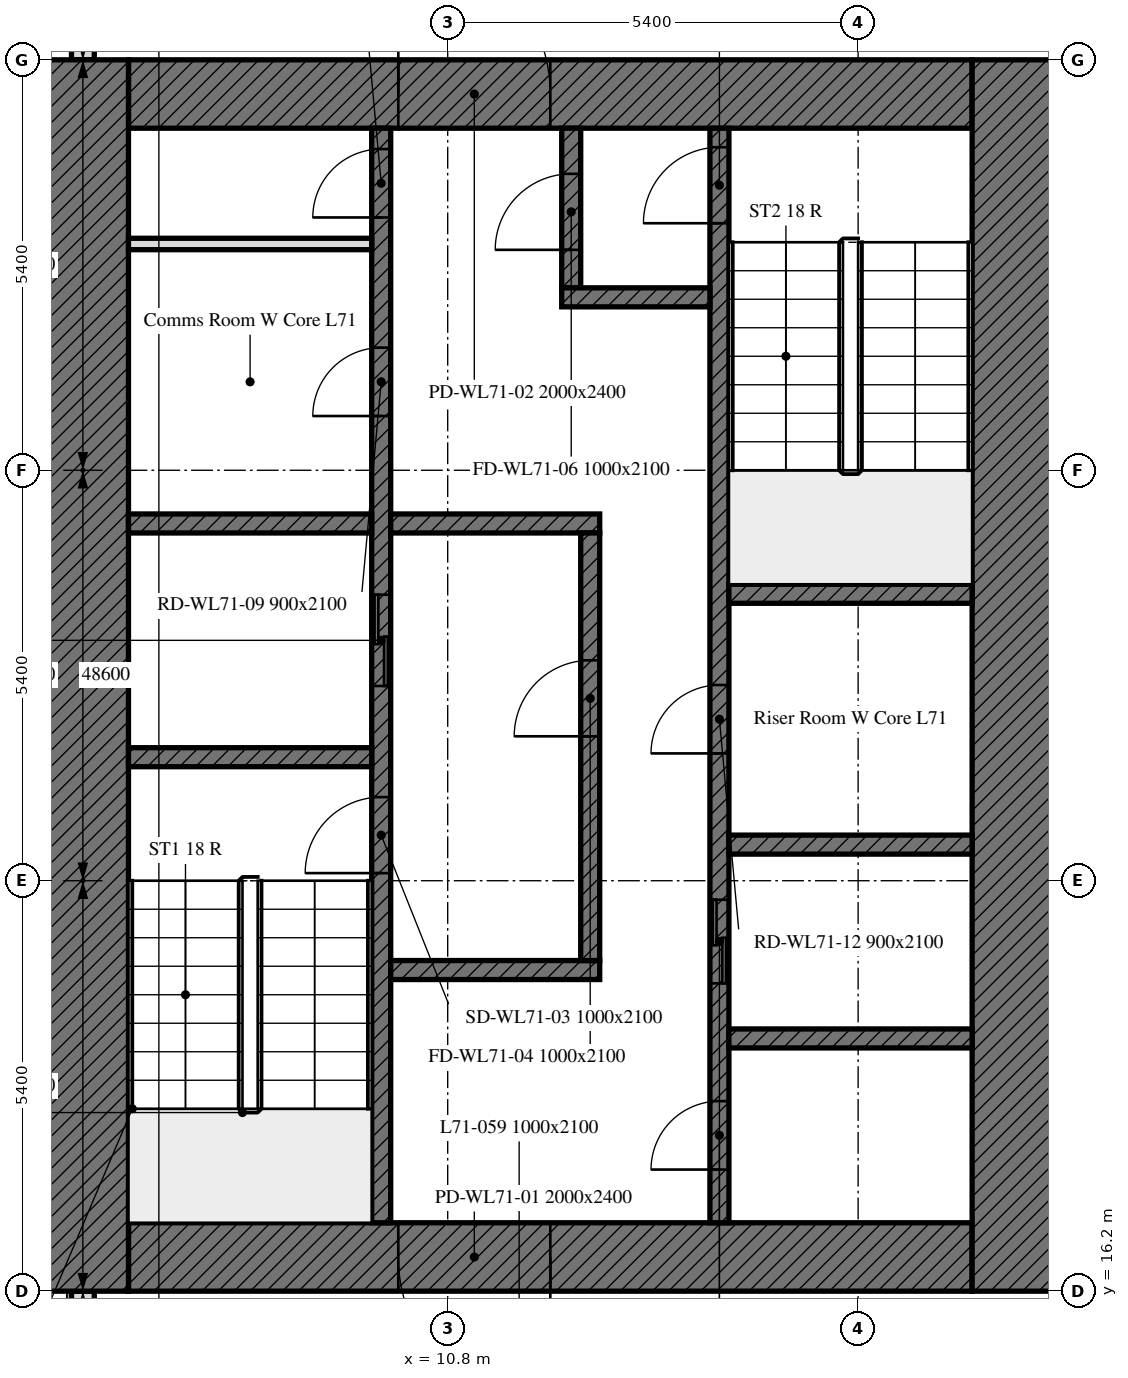
"""IFC4 building model, lengths in metres.
Left out: names, types, materials, properties, quantities, classifications, styles, units other than length and angle.
Written with IfcOpenShell. Run it as: python <this file> out.ifc"""

import sys

from ifc_helpers import new_model, si_unit, direction, frame, frame_2d, origin, place, context, subcontext, project, spatial, rectangle, extrude, element, fill, save


model = new_model("IFC4")
c1 = context("Model", 3, precision=1e-05, world=origin(), true_north=direction((0.0, 1.0)))
c2 = subcontext(c1, "Body", "Model", "MODEL_VIEW")
j1 = project(units=[si_unit("LENGTHUNIT", "METRE"), si_unit("PLANEANGLEUNIT", "RADIAN")], contexts=[c1])
p1 = place(None, origin())
s1 = spatial("IfcSite", under=j1, at=p1, CompositionType="ELEMENT")
p2 = place(p1, origin())
s2 = spatial("IfcBuilding", under=s1, at=p2, CompositionType="ELEMENT")
p3 = place(p2, frame((0.0, 0.0, 288.4)))
s3 = spatial("IfcBuildingStorey", under=s2, at=p3, CompositionType="ELEMENT", Elevation=288.4)
p4 = place(p3, frame((6.0, 43.014, 0.0), z_axis=(0.0, 0.0, 1.0), x_axis=(0.0, -1.0, 0.0)))
e1 = element("IfcWall", 1, at=p4, inside=s3, PredefinedType="SOLIDWALL", context=c2, shape_type="SweptSolid", body=[
    extrude(rectangle(XDim=10.614, YDim=0.3, at=frame_2d((5.307, 0.0))), origin(), (0.0, 0.0, 1.0), 3.0),
])
p5 = place(p4, frame((1.789, 0.0, 0.9)))
e2 = element("IfcOpeningElement", 2, at=p5, cuts=e1, PredefinedType="OPENING", context=c2, shape_type="SweptSolid", body=[
    extrude(rectangle(XDim=0.65, YDim=1.7, at=frame_2d((0.325, 0.85))), frame((0.0, 0.16, 0.0), z_axis=(0.0, -1.0, 0.0), x_axis=(1.0, 0.0, 0.0)), (0.0, 0.0, 1.0), 0.32),
])
p6 = place(p4, frame((2.764, 0.0, 0.9)))
e3 = element("IfcOpeningElement", 3, at=p6, cuts=e1, PredefinedType="OPENING", context=c2, shape_type="SweptSolid", body=[
    extrude(rectangle(XDim=1.1, YDim=1.7, at=frame_2d((0.55, 0.85))), frame((0.0, 0.16, 0.0), z_axis=(0.0, -1.0, 0.0), x_axis=(1.0, 0.0, 0.0)), (0.0, 0.0, 1.0), 0.32),
])
p7 = place(p4, frame((6.564, 0.0, 0.9)))
e4 = element("IfcOpeningElement", 4, at=p7, cuts=e1, PredefinedType="OPENING", context=c2, shape_type="SweptSolid", body=[
    extrude(rectangle(XDim=1.1, YDim=1.7, at=frame_2d((0.55, 0.85))), frame((0.0, 0.16, 0.0), z_axis=(0.0, -1.0, 0.0), x_axis=(1.0, 0.0, 0.0)), (0.0, 0.0, 1.0), 0.32),
])
p8 = place(p4, frame((8.539, 0.0, 0.9)))
e5 = element("IfcOpeningElement", 5, at=p8, cuts=e1, PredefinedType="OPENING", context=c2, shape_type="SweptSolid", body=[
    extrude(rectangle(XDim=0.65, YDim=1.7, at=frame_2d((0.325, 0.85))), frame((0.0, 0.16, 0.0), z_axis=(0.0, -1.0, 0.0), x_axis=(1.0, 0.0, 0.0)), (0.0, 0.0, 1.0), 0.32),
])
p9 = place(p3, frame((6.0, 16.2, 0.0), z_axis=(0.0, 0.0, 1.0), x_axis=(0.0, -1.0, 0.0)))
e6 = element("IfcWall", 6, at=p9, inside=s3, PredefinedType="SOLIDWALL", context=c2, shape_type="SweptSolid", body=[
    extrude(rectangle(XDim=5.214, YDim=0.3, at=frame_2d((2.607, 0.0))), origin(), (0.0, 0.0, 1.0), 3.0),
])
p10 = place(p9, frame((1.0, 0.0, 0.9)))
e7 = element("IfcOpeningElement", 7, at=p10, cuts=e6, PredefinedType="OPENING", context=c2, shape_type="SweptSolid", body=[
    extrude(rectangle(XDim=1.1, YDim=1.7, at=frame_2d((0.55, 0.85))), frame((0.0, 0.16, 0.0), z_axis=(0.0, -1.0, 0.0), x_axis=(1.0, 0.0, 0.0)), (0.0, 0.0, 1.0), 0.32),
])
p11 = place(p9, frame((2.95, 0.0, 0.9)))
e8 = element("IfcOpeningElement", 8, at=p11, cuts=e6, PredefinedType="OPENING", context=c2, shape_type="SweptSolid", body=[
    extrude(rectangle(XDim=1.1, YDim=1.7, at=frame_2d((0.55, 0.85))), frame((0.0, 0.16, 0.0), z_axis=(0.0, -1.0, 0.0), x_axis=(1.0, 0.0, 0.0)), (0.0, 0.0, 1.0), 0.32),
])
p12 = place(p3, frame((17.7, 16.65, 0.0), z_axis=(0.0, 0.0, 1.0), x_axis=(-1.0, 0.0, 0.0)))
e9 = element("IfcWall", 9, at=p12, inside=s3, PredefinedType="SOLIDWALL", context=c2, shape_type="SweptSolid", body=[
    extrude(rectangle(XDim=11.1, YDim=0.9, at=frame_2d((5.55, 0.0))), origin(), (0.0, 0.0, 1.0), 3.0),
])
p13 = place(p12, frame((5.55, 0.0, 0.0)))
e10 = element("IfcOpeningElement", 10, at=p13, cuts=e9, PredefinedType="OPENING", context=c2, shape_type="SweptSolid", body=[
    extrude(rectangle(XDim=2.0, YDim=2.4, at=frame_2d((1.0, 1.2))), frame((0.0, 0.45, 0.0), z_axis=(0.0, -1.0, 0.0), x_axis=(1.0, 0.0, 0.0)), (0.0, 0.0, 1.0), 0.9),
])
p14 = place(p3, frame((6.6, 31.95, 0.0), z_axis=(0.0, 0.0, 1.0), x_axis=(1.0, 0.0, 0.0)))
e11 = element("IfcWall", 11, at=p14, inside=s3, PredefinedType="SOLIDWALL", context=c2, shape_type="SweptSolid", body=[
    extrude(rectangle(XDim=11.1, YDim=0.9, at=frame_2d((5.55, 0.0))), origin(), (0.0, 0.0, 1.0), 3.0),
])
p15 = place(p14, frame((3.55, 0.0, 0.0)))
e12 = element("IfcOpeningElement", 12, at=p15, cuts=e11, PredefinedType="OPENING", context=c2, shape_type="SweptSolid", body=[
    extrude(rectangle(XDim=2.0, YDim=2.4, at=frame_2d((1.0, 1.2))), frame((0.0, 0.45, 0.0), z_axis=(0.0, -1.0, 0.0), x_axis=(1.0, 0.0, 0.0)), (0.0, 0.0, 1.0), 0.9),
])
for number, where, z_axis, x_axis in (
    (13, (6.0, 16.2, 0.0), (0.0, 0.0, 1.0), (0.0, 1.0, 0.0)),
    (14, (18.3, 32.4, 0.0), (0.0, 0.0, 1.0), (0.0, -1.0, 0.0)),
):
    element("IfcWall", number, at=place(p3, frame(where, z_axis=z_axis, x_axis=x_axis)), inside=s3, PredefinedType="SOLIDWALL", context=c2, shape_type="SweptSolid", body=[
        extrude(rectangle(XDim=16.2, YDim=1.2, at=frame_2d((8.1, 0.0))), origin(), (0.0, 0.0, 1.0), 3.0),
    ])
p16 = place(p3, frame((9.925, 17.1, 0.0), z_axis=(0.0, 0.0, 1.0), x_axis=(0.0, 1.0, 0.0)))
e15 = element("IfcWall", 15, at=p16, inside=s3, PredefinedType="SOLIDWALL", context=c2, shape_type="SweptSolid", body=[
    extrude(rectangle(XDim=14.4, YDim=0.25, at=frame_2d((7.2, 0.0))), origin(), (0.0, 0.0, 1.0), 3.0),
])
p17 = place(p16, frame((4.6, 0.0, 0.0)))
e16 = element("IfcOpeningElement", 16, at=p17, cuts=e15, PredefinedType="OPENING", context=c2, shape_type="SweptSolid", body=[
    extrude(rectangle(XDim=1.0, YDim=2.1, at=frame_2d((0.5, 1.05))), frame((0.0, 0.125, 0.0), z_axis=(0.0, -1.0, 0.0), x_axis=(1.0, 0.0, 0.0)), (0.0, 0.0, 1.0), 0.25),
])
p18 = place(p16, frame((7.062, 0.0, 0.0)))
e17 = element("IfcOpeningElement", 17, at=p18, cuts=e15, PredefinedType="OPENING", context=c2, shape_type="SweptSolid", body=[
    extrude(rectangle(XDim=1.2, YDim=2.1, at=frame_2d((0.6, 1.05))), frame((0.0, 0.125, 0.0), z_axis=(0.0, -1.0, 0.0), x_axis=(1.0, 0.0, 0.0)), (0.0, 0.0, 1.0), 0.25),
])
p19 = place(p16, frame((10.614, 0.0, 0.0)))
e18 = element("IfcOpeningElement", 18, at=p19, cuts=e15, PredefinedType="OPENING", context=c2, shape_type="SweptSolid", body=[
    extrude(rectangle(XDim=0.9, YDim=2.1, at=frame_2d((0.45, 1.05))), frame((0.0, 0.125, 0.0), z_axis=(0.0, -1.0, 0.0), x_axis=(1.0, 0.0, 0.0)), (0.0, 0.0, 1.0), 0.25),
])
p20 = place(p16, frame((13.226, 0.0, 0.0)))
e19 = element("IfcOpeningElement", 19, at=p20, cuts=e15, PredefinedType="OPENING", context=c2, shape_type="SweptSolid", body=[
    extrude(rectangle(XDim=0.9, YDim=2.1, at=frame_2d((0.45, 1.05))), frame((0.0, 0.125, 0.0), z_axis=(0.0, -1.0, 0.0), x_axis=(1.0, 0.0, 0.0)), (0.0, 0.0, 1.0), 0.25),
])
p21 = place(p3, frame((14.375, 17.1, 0.0), z_axis=(0.0, 0.0, 1.0), x_axis=(0.0, 1.0, 0.0)))
e20 = element("IfcWall", 20, at=p21, inside=s3, PredefinedType="SOLIDWALL", context=c2, shape_type="SweptSolid", body=[
    extrude(rectangle(XDim=14.4, YDim=0.25, at=frame_2d((7.2, 0.0))), origin(), (0.0, 0.0, 1.0), 3.0),
])
p22 = place(p21, frame((13.15, 0.0, 0.0)))
e21 = element("IfcOpeningElement", 21, at=p22, cuts=e20, PredefinedType="OPENING", context=c2, shape_type="SweptSolid", body=[
    extrude(rectangle(XDim=1.0, YDim=2.1, at=frame_2d((0.5, 1.05))), frame((0.0, 0.125, 0.0), z_axis=(0.0, -1.0, 0.0), x_axis=(1.0, 0.0, 0.0)), (0.0, 0.0, 1.0), 0.25),
])
p23 = place(p21, frame((3.15, 0.0, 0.0)))
e22 = element("IfcOpeningElement", 22, at=p23, cuts=e20, PredefinedType="OPENING", context=c2, shape_type="SweptSolid", body=[
    extrude(rectangle(XDim=1.1, YDim=2.1, at=frame_2d((0.55, 1.05))), frame((0.0, 0.125, 0.0), z_axis=(0.0, -1.0, 0.0), x_axis=(1.0, 0.0, 0.0)), (0.0, 0.0, 1.0), 0.25),
])
p24 = place(p21, frame((0.7, 0.0, 0.0)))
e23 = element("IfcOpeningElement", 23, at=p24, cuts=e20, PredefinedType="OPENING", context=c2, shape_type="SweptSolid", body=[
    extrude(rectangle(XDim=0.9, YDim=2.1, at=frame_2d((0.45, 1.05))), frame((0.0, 0.125, 0.0), z_axis=(0.0, -1.0, 0.0), x_axis=(1.0, 0.0, 0.0)), (0.0, 0.0, 1.0), 0.25),
])
p25 = place(p21, frame((6.175, 0.0, 0.0)))
e24 = element("IfcOpeningElement", 24, at=p25, cuts=e20, PredefinedType="OPENING", context=c2, shape_type="SweptSolid", body=[
    extrude(rectangle(XDim=0.9, YDim=2.1, at=frame_2d((0.45, 1.05))), frame((0.0, 0.125, 0.0), z_axis=(0.0, -1.0, 0.0), x_axis=(1.0, 0.0, 0.0)), (0.0, 0.0, 1.0), 0.25),
])
for number, where, z_axis, x_axis in (
    (25, (6.6, 23.225, 0.0), (0.0, 0.0, 1.0), (1.0, 0.0, 0.0)),
    (26, (14.5, 25.375, 0.0), (0.0, 0.0, 1.0), (1.0, 0.0, 0.0)),
    (27, (14.5, 22.075, 0.0), (0.0, 0.0, 1.0), (1.0, 0.0, 0.0)),
    (28, (6.6, 26.3, 0.0), (0.0, 0.0, 1.0), (1.0, 0.0, 0.0)),
):
    element("IfcWall", number, at=place(p3, frame(where, z_axis=z_axis, x_axis=x_axis)), inside=s3, PredefinedType="SOLIDWALL", context=c2, shape_type="SweptSolid", body=[
        extrude(rectangle(XDim=3.2, YDim=0.25, at=frame_2d((1.6, 0.0))), origin(), (0.0, 0.0, 1.0), 3.0),
    ])
for number, where, z_axis, x_axis in (
    (29, (10.05, 26.3, 0.0), (0.0, 0.0, 1.0), (1.0, 0.0, 0.0)),
    (30, (10.05, 20.425, 0.0), (0.0, 0.0, 1.0), (1.0, 0.0, 0.0)),
):
    element("IfcWall", number, at=place(p3, frame(where, z_axis=z_axis, x_axis=x_axis)), inside=s3, PredefinedType="SOLIDWALL", context=c2, shape_type="SweptSolid", body=[
        extrude(rectangle(XDim=2.75, YDim=0.25, at=frame_2d((1.375, 0.0))), origin(), (0.0, 0.0, 1.0), 3.0),
    ])
p26 = place(p3, frame((12.425, 29.4, 0.0), z_axis=(0.0, 0.0, 1.0), x_axis=(0.0, 1.0, 0.0)))
e31 = element("IfcWall", 31, at=p26, inside=s3, PredefinedType="SOLIDWALL", context=c2, shape_type="SweptSolid", body=[
    extrude(rectangle(XDim=2.1, YDim=0.25, at=frame_2d((1.05, 0.0))), origin(), (0.0, 0.0, 1.0), 3.0),
])
p27 = place(p26, frame((0.5, 0.0, 0.0)))
e32 = element("IfcOpeningElement", 32, at=p27, cuts=e31, PredefinedType="OPENING", context=c2, shape_type="SweptSolid", body=[
    extrude(rectangle(XDim=1.0, YDim=2.1, at=frame_2d((0.5, 1.05))), frame((0.0, 0.125, 0.0), z_axis=(0.0, -1.0, 0.0), x_axis=(1.0, 0.0, 0.0)), (0.0, 0.0, 1.0), 0.25),
])
p28 = place(p3, frame((12.3, 29.275, 0.0), z_axis=(0.0, 0.0, 1.0), x_axis=(1.0, 0.0, 0.0)))
e33 = element("IfcWall", 33, at=p28, inside=s3, PredefinedType="SOLIDWALL", context=c2, shape_type="SweptSolid", body=[
    extrude(rectangle(XDim=1.95, YDim=0.25, at=frame_2d((0.975, 0.0))), origin(), (0.0, 0.0, 1.0), 3.0),
])
p29 = place(p3, frame((12.675, 20.55, 0.0), z_axis=(0.0, 0.0, 1.0), x_axis=(0.0, 1.0, 0.0)))
e34 = element("IfcWall", 34, at=p29, inside=s3, PredefinedType="SOLIDWALL", context=c2, shape_type="SweptSolid", body=[
    extrude(rectangle(XDim=5.625, YDim=0.25, at=frame_2d((2.812, 0.0))), origin(), (0.0, 0.0, 1.0), 3.0),
])
p30 = place(p29, frame((2.95, 0.0, 0.0)))
e35 = element("IfcOpeningElement", 35, at=p30, cuts=e34, PredefinedType="OPENING", context=c2, shape_type="SweptSolid", body=[
    extrude(rectangle(XDim=1.0, YDim=2.1, at=frame_2d((0.5, 1.05))), frame((0.0, 0.125, 0.0), z_axis=(0.0, -1.0, 0.0), x_axis=(1.0, 0.0, 0.0)), (0.0, 0.0, 1.0), 0.25),
])
p31 = place(p3, frame((14.5, 19.525, 0.0), z_axis=(0.0, 0.0, 1.0), x_axis=(1.0, 0.0, 0.0)))
e36 = element("IfcWall", 36, at=p31, inside=s3, PredefinedType="SOLIDWALL", context=c2, shape_type="SweptSolid", body=[
    extrude(rectangle(XDim=3.2, YDim=0.25, at=frame_2d((1.6, 0.0))), origin(), (0.0, 0.0, 1.0), 3.0),
])
p32 = place(p3, frame((6.6, 29.977, 0.0), z_axis=(0.0, 0.0, 1.0), x_axis=(1.0, 0.0, 0.0)))
e37 = element("IfcWall", 37, at=p32, inside=s3, PredefinedType="PARTITIONING", context=c2, shape_type="SweptSolid", body=[
    extrude(rectangle(XDim=3.2, YDim=0.15, at=frame_2d((1.6, 0.0))), origin(), (0.0, 0.0, 1.0), 3.0),
])
p33 = place(p13, origin())
e38 = element("IfcDoor", 38, at=p33, inside=s3, OperationType="DOUBLE_DOOR_SINGLE_SWING", PredefinedType="DOOR", context=c2, shape_type="SweptSolid", body=[
    extrude(rectangle(XDim=2.0, YDim=2.4, at=frame_2d((1.0, 1.2))), frame((0.0, 0.025, 0.0), z_axis=(0.0, -1.0, 0.0), x_axis=(1.0, 0.0, 0.0)), (0.0, 0.0, 1.0), 0.05),
])
fill(e10, e38)
p34 = place(p15, origin())
e39 = element("IfcDoor", 39, at=p34, inside=s3, OperationType="DOUBLE_DOOR_SINGLE_SWING", PredefinedType="DOOR", context=c2, shape_type="SweptSolid", body=[
    extrude(rectangle(XDim=2.0, YDim=2.4, at=frame_2d((1.0, 1.2))), frame((0.0, 0.025, 0.0), z_axis=(0.0, -1.0, 0.0), x_axis=(1.0, 0.0, 0.0)), (0.0, 0.0, 1.0), 0.05),
])
fill(e12, e39)
p35 = place(p17, origin())
e40 = element("IfcDoor", 40, at=p35, inside=s3, OperationType="SINGLE_SWING_LEFT", PredefinedType="DOOR", context=c2, shape_type="SweptSolid", body=[
    extrude(rectangle(XDim=1.0, YDim=2.1, at=frame_2d((0.5, 1.05))), frame((0.0, 0.025, 0.0), z_axis=(0.0, -1.0, 0.0), x_axis=(1.0, 0.0, 0.0)), (0.0, 0.0, 1.0), 0.05),
])
fill(e16, e40)
p36 = place(p30, origin())
e41 = element("IfcDoor", 41, at=p36, inside=s3, OperationType="SINGLE_SWING_LEFT", PredefinedType="DOOR", context=c2, shape_type="SweptSolid", body=[
    extrude(rectangle(XDim=1.0, YDim=2.1, at=frame_2d((0.5, 1.05))), frame((0.0, 0.025, 0.0), z_axis=(0.0, -1.0, 0.0), x_axis=(1.0, 0.0, 0.0)), (0.0, 0.0, 1.0), 0.05),
])
fill(e35, e41)
p37 = place(p22, origin())
e42 = element("IfcDoor", 42, at=p37, inside=s3, OperationType="SINGLE_SWING_LEFT", PredefinedType="DOOR", context=c2, shape_type="SweptSolid", body=[
    extrude(rectangle(XDim=1.0, YDim=2.1, at=frame_2d((0.5, 1.05))), frame((0.0, 0.025, 0.0), z_axis=(0.0, -1.0, 0.0), x_axis=(1.0, 0.0, 0.0)), (0.0, 0.0, 1.0), 0.05),
])
fill(e21, e42)
p38 = place(p27, origin())
e43 = element("IfcDoor", 43, at=p38, inside=s3, OperationType="SINGLE_SWING_LEFT", PredefinedType="DOOR", context=c2, shape_type="SweptSolid", body=[
    extrude(rectangle(XDim=1.0, YDim=2.1, at=frame_2d((0.5, 1.05))), frame((0.0, 0.025, 0.0), z_axis=(0.0, -1.0, 0.0), x_axis=(1.0, 0.0, 0.0)), (0.0, 0.0, 1.0), 0.05),
])
fill(e32, e43)
p39 = place(p18, origin())
e44 = element("IfcDoor", 44, at=p39, inside=s3, OperationType="DOUBLE_DOOR_SLIDING", PredefinedType="DOOR", context=c2, shape_type="SweptSolid", body=[
    extrude(rectangle(XDim=1.2, YDim=2.1, at=frame_2d((0.6, 1.05))), frame((0.0, 0.025, 0.0), z_axis=(0.0, -1.0, 0.0), x_axis=(1.0, 0.0, 0.0)), (0.0, 0.0, 1.0), 0.05),
])
fill(e17, e44)
p40 = place(p23, origin())
e45 = element("IfcDoor", 45, at=p40, inside=s3, OperationType="DOUBLE_DOOR_SLIDING", PredefinedType="DOOR", context=c2, shape_type="SweptSolid", body=[
    extrude(rectangle(XDim=1.1, YDim=2.1, at=frame_2d((0.55, 1.05))), frame((0.0, 0.025, 0.0), z_axis=(0.0, -1.0, 0.0), x_axis=(1.0, 0.0, 0.0)), (0.0, 0.0, 1.0), 0.05),
])
fill(e22, e45)
p41 = place(p19, origin())
e46 = element("IfcDoor", 46, at=p41, inside=s3, OperationType="SINGLE_SWING_LEFT", PredefinedType="DOOR", context=c2, shape_type="SweptSolid", body=[
    extrude(rectangle(XDim=0.9, YDim=2.1, at=frame_2d((0.45, 1.05))), frame((0.0, 0.025, 0.0), z_axis=(0.0, -1.0, 0.0), x_axis=(1.0, 0.0, 0.0)), (0.0, 0.0, 1.0), 0.05),
])
fill(e18, e46)
p42 = place(p20, origin())
e47 = element("IfcDoor", 47, at=p42, inside=s3, OperationType="SINGLE_SWING_LEFT", PredefinedType="DOOR", context=c2, shape_type="SweptSolid", body=[
    extrude(rectangle(XDim=0.9, YDim=2.1, at=frame_2d((0.45, 1.05))), frame((0.0, 0.025, 0.0), z_axis=(0.0, -1.0, 0.0), x_axis=(1.0, 0.0, 0.0)), (0.0, 0.0, 1.0), 0.05),
])
fill(e19, e47)
p43 = place(p24, origin())
e48 = element("IfcDoor", 48, at=p43, inside=s3, OperationType="SINGLE_SWING_LEFT", PredefinedType="DOOR", context=c2, shape_type="SweptSolid", body=[
    extrude(rectangle(XDim=0.9, YDim=2.1, at=frame_2d((0.45, 1.05))), frame((0.0, 0.025, 0.0), z_axis=(0.0, -1.0, 0.0), x_axis=(1.0, 0.0, 0.0)), (0.0, 0.0, 1.0), 0.05),
])
fill(e23, e48)
p44 = place(p25, origin())
e49 = element("IfcDoor", 49, at=p44, inside=s3, OperationType="SINGLE_SWING_LEFT", PredefinedType="DOOR", context=c2, shape_type="SweptSolid", body=[
    extrude(rectangle(XDim=0.9, YDim=2.1, at=frame_2d((0.45, 1.05))), frame((0.0, 0.025, 0.0), z_axis=(0.0, -1.0, 0.0), x_axis=(1.0, 0.0, 0.0)), (0.0, 0.0, 1.0), 0.05),
])
fill(e24, e49)
save(model, sys.argv[1])
